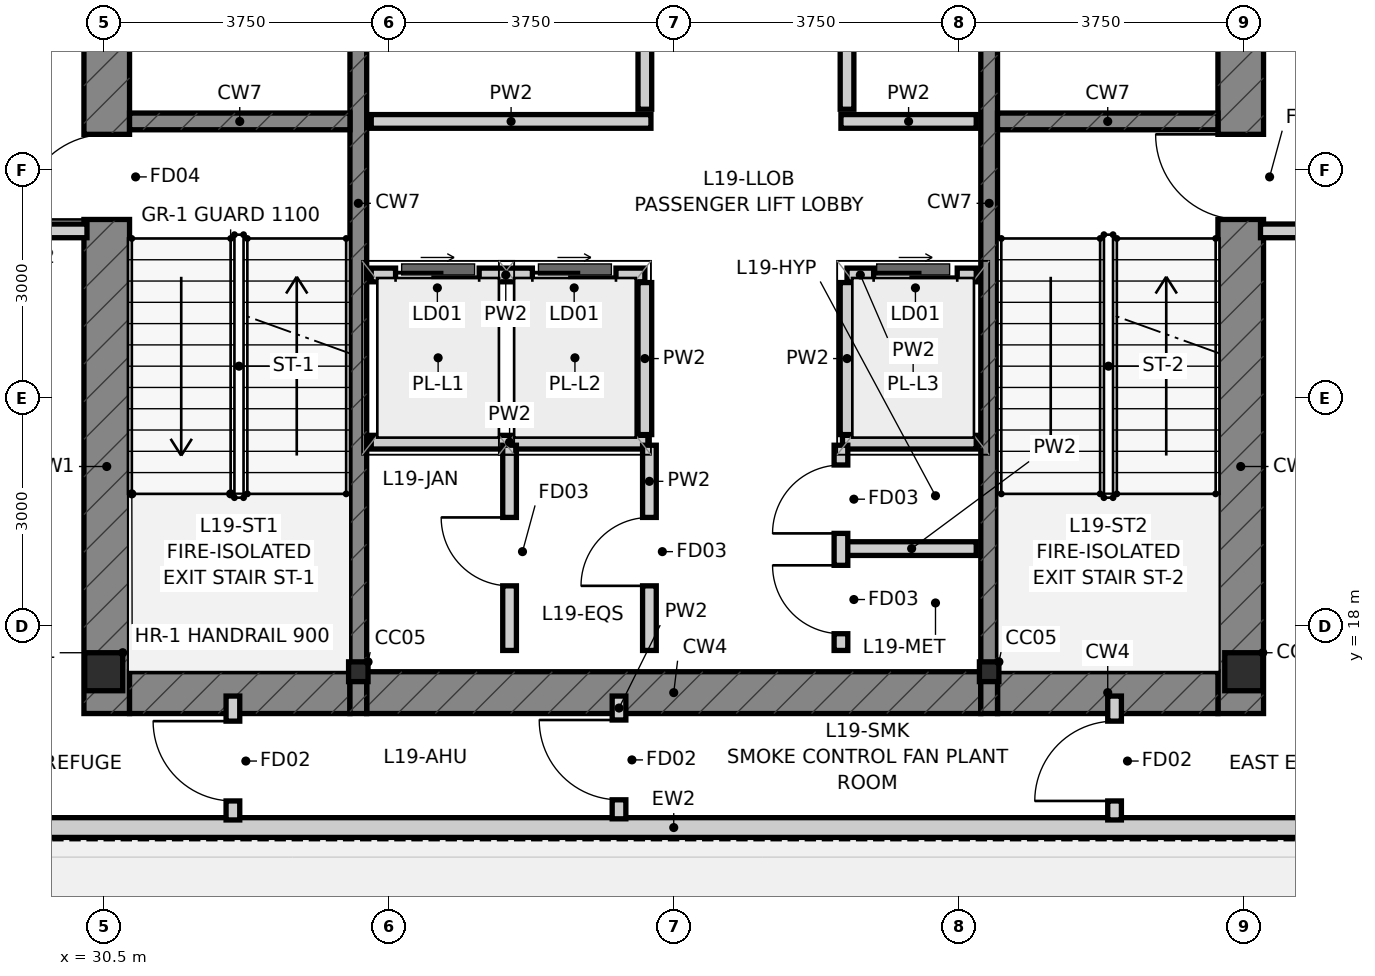
"""IFC4 building model, lengths in metres.
Left out: names, types, materials, properties, quantities, classifications, styles, units other than length and angle.
Written with IfcOpenShell. Run it as: python <this file> out.ifc"""

import sys

from ifc_helpers import new_model, si_unit, direction, frame, frame_2d, origin, origin_2d, place, context, subcontext, project, spatial, rectangle, i_section, extrude, source, transform, mapped, element, fill, save


model = new_model("IFC4")
c1 = context("Model", 3, precision=1e-05, world=origin(), true_north=direction((0.0, 1.0)))
c2 = subcontext(c1, "Body", "Model", "MODEL_VIEW")
j1 = project(units=[si_unit("LENGTHUNIT", "METRE"), si_unit("PLANEANGLEUNIT", "RADIAN")], contexts=[c1])
p1 = place(None, origin())
s1 = spatial("IfcSite", under=j1, at=p1, CompositionType="ELEMENT")
p2 = place(p1, origin())
s2 = spatial("IfcBuilding", under=s1, at=p2, CompositionType="ELEMENT")
p3 = place(p2, frame((0.0, 0.0, 75.05)))
s3 = spatial("IfcBuildingStorey", under=s2, at=p3, CompositionType="ELEMENT", Elevation=75.05)
m1 = source(origin(), c2, "Body", "SweptSolid", [
    extrude(i_section(OverallWidth=0.5, OverallDepth=0.5, WebThickness=0.028, FlangeThickness=0.04, at=origin_2d()), origin(), (0.0, 0.0, 1.0), 4.8),
])
for number, where, z_axis, x_axis in (
    (1, (30.5, 17.4, 0.0), (0.0, 0.0, 1.0), (1.0, 0.0, 0.0)),
    (2, (45.5, 17.4, 0.0), (0.0, 0.0, 1.0), (1.0, 0.0, 0.0)),
):
    element("IfcColumn", number, at=place(p3, frame(where, z_axis=z_axis, x_axis=x_axis)), inside=s3, PredefinedType="COLUMN", context=c2, shape_type="MappedRepresentation", body=[
        mapped(m1, transform((0.0, 0.0, 0.0), scale=1.0)),
    ])
m2 = source(origin(), c2, "Body", "SweptSolid", [
    extrude(i_section(OverallWidth=0.256, OverallDepth=0.26, WebThickness=0.01, FlangeThickness=0.017, at=origin_2d()), origin(), (0.0, 0.0, 1.0), 4.8),
])
for number, where, z_axis, x_axis in (
    (3, (33.85, 17.4, 0.0), (0.0, 0.0, 1.0), (1.0, 0.0, 0.0)),
    (4, (42.15, 17.4, 0.0), (0.0, 0.0, 1.0), (1.0, 0.0, 0.0)),
):
    element("IfcColumn", number, at=place(p3, frame(where, z_axis=z_axis, x_axis=x_axis)), inside=s3, PredefinedType="COLUMN", context=c2, shape_type="MappedRepresentation", body=[
        mapped(m2, transform((0.0, 0.0, 0.0), scale=1.0)),
    ])
p4 = place(p3, frame((30.54, 16.85, 0.0), z_axis=(0.0, 0.0, 1.0), x_axis=(0.0, 1.0, 0.0)))
e5 = element("IfcWall", 5, at=p4, inside=s3, PredefinedType="SHEAR", context=c2, shape_type="SweptSolid", body=[
    extrude(rectangle(XDim=13.425, YDim=0.6, at=frame_2d((6.712, 0.0))), origin(), (0.0, 0.0, 1.0), 4.8),
])
p5 = place(p4, frame((6.5, 0.0, 0.0)))
e6 = element("IfcOpeningElement", 6, at=p5, cuts=e5, PredefinedType="OPENING", context=c2, shape_type="SweptSolid", body=[
    extrude(rectangle(XDim=1.12, YDim=2.15, at=frame_2d((0.56, 1.075))), frame((0.0, 0.312, 0.0), z_axis=(0.0, -1.0, 0.0), x_axis=(1.0, 0.0, 0.0)), (0.0, 0.0, 1.0), 0.624),
])
p6 = place(p4, frame((10.95, 0.0, 0.0)))
e7 = element("IfcOpeningElement", 7, at=p6, cuts=e5, PredefinedType="OPENING", context=c2, shape_type="SweptSolid", body=[
    extrude(rectangle(XDim=1.2, YDim=2.2, at=frame_2d((0.6, 1.1))), frame((0.0, 0.312, 0.0), z_axis=(0.0, -1.0, 0.0), x_axis=(1.0, 0.0, 0.0)), (0.0, 0.0, 1.0), 0.624),
])
p7 = place(p3, frame((45.46, 16.85, 0.0), z_axis=(0.0, 0.0, 1.0), x_axis=(0.0, 1.0, 0.0)))
e8 = element("IfcWall", 8, at=p7, inside=s3, PredefinedType="SHEAR", context=c2, shape_type="SweptSolid", body=[
    extrude(rectangle(XDim=13.425, YDim=0.6, at=frame_2d((6.712, 0.0))), origin(), (0.0, 0.0, 1.0), 4.8),
])
p8 = place(p7, frame((6.5, 0.0, 0.0)))
e9 = element("IfcOpeningElement", 9, at=p8, cuts=e8, PredefinedType="OPENING", context=c2, shape_type="SweptSolid", body=[
    extrude(rectangle(XDim=1.12, YDim=2.15, at=frame_2d((0.56, 1.075))), frame((0.0, 0.312, 0.0), z_axis=(0.0, -1.0, 0.0), x_axis=(1.0, 0.0, 0.0)), (0.0, 0.0, 1.0), 0.624),
])
p9 = place(p7, frame((10.95, 0.0, 0.0)))
e10 = element("IfcOpeningElement", 10, at=p9, cuts=e8, PredefinedType="OPENING", context=c2, shape_type="SweptSolid", body=[
    extrude(rectangle(XDim=1.2, YDim=2.2, at=frame_2d((0.6, 1.1))), frame((0.0, 0.312, 0.0), z_axis=(0.0, -1.0, 0.0), x_axis=(1.0, 0.0, 0.0)), (0.0, 0.0, 1.0), 0.624),
])
p10 = place(p3, frame((30.84, 17.125, 0.0), z_axis=(0.0, 0.0, 1.0), x_axis=(1.0, 0.0, 0.0)))
e11 = element("IfcWall", 11, at=p10, inside=s3, PredefinedType="SHEAR", context=c2, shape_type="SweptSolid", body=[
    extrude(rectangle(XDim=2.9, YDim=0.55, at=frame_2d((1.45, 0.0))), origin(), (0.0, 0.0, 1.0), 4.8),
])
p11 = place(p3, frame((33.96, 17.125, 0.0), z_axis=(0.0, 0.0, 1.0), x_axis=(1.0, 0.0, 0.0)))
e12 = element("IfcWall", 12, at=p11, inside=s3, PredefinedType="SHEAR", context=c2, shape_type="SweptSolid", body=[
    extrude(rectangle(XDim=8.08, YDim=0.55, at=frame_2d((4.04, 0.0))), origin(), (0.0, 0.0, 1.0), 4.8),
])
p12 = place(p3, frame((42.26, 17.125, 0.0), z_axis=(0.0, 0.0, 1.0), x_axis=(1.0, 0.0, 0.0)))
e13 = element("IfcWall", 13, at=p12, inside=s3, PredefinedType="SHEAR", context=c2, shape_type="SweptSolid", body=[
    extrude(rectangle(XDim=2.9, YDim=0.55, at=frame_2d((1.45, 0.0))), origin(), (0.0, 0.0, 1.0), 4.8),
])
for number, where, z_axis, x_axis in (
    (14, (33.85, 16.85, 0.0), (0.0, 0.0, 1.0), (0.0, 1.0, 0.0)),
    (15, (42.15, 16.85, 0.0), (0.0, 0.0, 1.0), (0.0, 1.0, 0.0)),
):
    element("IfcWall", number, at=place(p3, frame(where, z_axis=z_axis, x_axis=x_axis)), inside=s3, PredefinedType="SHEAR", context=c2, shape_type="SweptSolid", body=[
        extrude(rectangle(XDim=13.425, YDim=0.22, at=frame_2d((6.712, 0.0))), origin(), (0.0, 0.0, 1.0), 4.8),
    ])
for number, where, z_axis, x_axis in (
    (16, (30.84, 24.64, 0.0), (0.0, 0.0, 1.0), (1.0, 0.0, 0.0)),
    (17, (42.26, 24.64, 0.0), (0.0, 0.0, 1.0), (1.0, 0.0, 0.0)),
):
    element("IfcWall", number, at=place(p3, frame(where, z_axis=z_axis, x_axis=x_axis)), inside=s3, PredefinedType="SHEAR", context=c2, shape_type="SweptSolid", body=[
        extrude(rectangle(XDim=2.9, YDim=0.22, at=frame_2d((1.45, 0.0))), origin(), (0.0, 0.0, 1.0), 4.8),
    ])
p13 = place(p3, frame((26.95, 15.35, 0.0), z_axis=(0.0, 0.0, 1.0), x_axis=(1.0, 0.0, 0.0)))
e18 = element("IfcWall", 18, at=p13, inside=s3, PredefinedType="STANDARD", context=c2, shape_type="SweptSolid", body=[
    extrude(rectangle(XDim=22.1, YDim=0.26, at=frame_2d((11.05, 0.0))), origin(), (0.0, 0.0, 1.0), 4.176),
])
p14 = place(p3, frame((34.02, 22.62, 0.0), z_axis=(0.0, 0.0, 1.0), x_axis=(1.0, 0.0, 0.0)))
e19 = element("IfcWall", 19, at=p14, inside=s3, PredefinedType="PARTITIONING", context=c2, shape_type="SweptSolid", body=[
    extrude(rectangle(XDim=3.6, YDim=0.18, at=frame_2d((1.8, 0.0))), origin(), (0.0, 0.0, 1.0), 4.55),
])
p15 = place(p14, frame((0.32, 0.0, 0.0)))
e20 = element("IfcOpeningElement", 20, at=p15, cuts=e19, PredefinedType="OPENING", context=c2, shape_type="SweptSolid", body=[
    extrude(rectangle(XDim=1.1, YDim=2.2, at=frame_2d((0.55, 1.1))), frame((0.0, 0.102, 0.0), z_axis=(0.0, -1.0, 0.0), x_axis=(1.0, 0.0, 0.0)), (0.0, 0.0, 1.0), 0.204),
])
p16 = place(p14, frame((2.12, 0.0, 0.0)))
e21 = element("IfcOpeningElement", 21, at=p16, cuts=e19, PredefinedType="OPENING", context=c2, shape_type="SweptSolid", body=[
    extrude(rectangle(XDim=1.1, YDim=2.2, at=frame_2d((0.55, 1.1))), frame((0.0, 0.102, 0.0), z_axis=(0.0, -1.0, 0.0), x_axis=(1.0, 0.0, 0.0)), (0.0, 0.0, 1.0), 0.204),
])
p17 = place(p3, frame((40.28, 22.62, 0.0), z_axis=(0.0, 0.0, 1.0), x_axis=(1.0, 0.0, 0.0)))
e22 = element("IfcWall", 22, at=p17, inside=s3, PredefinedType="PARTITIONING", context=c2, shape_type="SweptSolid", body=[
    extrude(rectangle(XDim=1.7, YDim=0.18, at=frame_2d((0.85, 0.0))), origin(), (0.0, 0.0, 1.0), 4.55),
])
p18 = place(p17, frame((0.35, 0.0, 0.0)))
e23 = element("IfcOpeningElement", 23, at=p18, cuts=e22, PredefinedType="OPENING", context=c2, shape_type="SweptSolid", body=[
    extrude(rectangle(XDim=1.1, YDim=2.2, at=frame_2d((0.55, 1.1))), frame((0.0, 0.102, 0.0), z_axis=(0.0, -1.0, 0.0), x_axis=(1.0, 0.0, 0.0)), (0.0, 0.0, 1.0), 0.204),
])
for number, where, z_axis, x_axis in (
    (24, (37.62, 20.52, 0.0), (0.0, 0.0, 1.0), (0.0, 1.0, 0.0)),
    (25, (40.28, 20.52, 0.0), (0.0, 0.0, 1.0), (0.0, 1.0, 0.0)),
    (26, (37.62, 24.8, 0.0), (0.0, 0.0, 1.0), (0.0, 1.0, 0.0)),
    (27, (40.28, 24.8, 0.0), (0.0, 0.0, 1.0), (0.0, 1.0, 0.0)),
):
    element("IfcWall", number, at=place(p3, frame(where, z_axis=z_axis, x_axis=x_axis)), inside=s3, PredefinedType="PARTITIONING", context=c2, shape_type="SweptSolid", body=[
        extrude(rectangle(XDim=2.0, YDim=0.18, at=frame_2d((1.0, 0.0))), origin(), (0.0, 0.0, 1.0), 4.55),
    ])
p19 = place(p3, frame((34.02, 24.64, 0.0), z_axis=(0.0, 0.0, 1.0), x_axis=(1.0, 0.0, 0.0)))
e28 = element("IfcWall", 28, at=p19, inside=s3, PredefinedType="PARTITIONING", context=c2, shape_type="SweptSolid", body=[
    extrude(rectangle(XDim=3.68, YDim=0.18, at=frame_2d((1.84, 0.0))), origin(), (0.0, 0.0, 1.0), 4.55),
])
p20 = place(p3, frame((40.2, 24.64, 0.0), z_axis=(0.0, 0.0, 1.0), x_axis=(1.0, 0.0, 0.0)))
e29 = element("IfcWall", 29, at=p20, inside=s3, PredefinedType="PARTITIONING", context=c2, shape_type="SweptSolid", body=[
    extrude(rectangle(XDim=1.78, YDim=0.18, at=frame_2d((0.89, 0.0))), origin(), (0.0, 0.0, 1.0), 4.55),
])
p21 = place(p3, frame((27.065, 23.2, 0.0), z_axis=(0.0, 0.0, 1.0), x_axis=(1.0, 0.0, 0.0)))
e30 = element("IfcWall", 30, at=p21, inside=s3, PredefinedType="PARTITIONING", context=c2, shape_type="SweptSolid", body=[
    extrude(rectangle(XDim=3.215, YDim=0.18, at=frame_2d((1.607, 0.0))), origin(), (0.0, 0.0, 1.0), 4.55),
])
p22 = place(p21, frame((0.75, 0.0, 0.0)))
e31 = element("IfcOpeningElement", 31, at=p22, cuts=e30, PredefinedType="OPENING", context=c2, shape_type="SweptSolid", body=[
    extrude(rectangle(XDim=1.05, YDim=2.15, at=frame_2d((0.525, 1.075))), frame((0.0, 0.102, 0.0), z_axis=(0.0, -1.0, 0.0), x_axis=(1.0, 0.0, 0.0)), (0.0, 0.0, 1.0), 0.204),
])
p23 = place(p3, frame((45.72, 23.2, 0.0), z_axis=(0.0, 0.0, 1.0), x_axis=(1.0, 0.0, 0.0)))
e32 = element("IfcWall", 32, at=p23, inside=s3, PredefinedType="PARTITIONING", context=c2, shape_type="SweptSolid", body=[
    extrude(rectangle(XDim=3.215, YDim=0.18, at=frame_2d((1.607, 0.0))), origin(), (0.0, 0.0, 1.0), 4.55),
])
p24 = place(p23, frame((0.75, 0.0, 0.0)))
e33 = element("IfcOpeningElement", 33, at=p24, cuts=e32, PredefinedType="OPENING", context=c2, shape_type="SweptSolid", body=[
    extrude(rectangle(XDim=1.05, YDim=2.15, at=frame_2d((0.525, 1.075))), frame((0.0, 0.102, 0.0), z_axis=(0.0, -1.0, 0.0), x_axis=(1.0, 0.0, 0.0)), (0.0, 0.0, 1.0), 0.204),
])
p25 = place(p3, frame((34.02, 20.42, 0.0), z_axis=(0.0, 0.0, 1.0), x_axis=(1.0, 0.0, 0.0)))
e34 = element("IfcWall", 34, at=p25, inside=s3, PredefinedType="PARTITIONING", context=c2, shape_type="SweptSolid", body=[
    extrude(rectangle(XDim=3.64, YDim=0.18, at=frame_2d((1.82, 0.0))), origin(), (0.0, 0.0, 1.0), 4.55),
])
p26 = place(p3, frame((40.22, 20.42, 0.0), z_axis=(0.0, 0.0, 1.0), x_axis=(1.0, 0.0, 0.0)))
e35 = element("IfcWall", 35, at=p26, inside=s3, PredefinedType="PARTITIONING", context=c2, shape_type="SweptSolid", body=[
    extrude(rectangle(XDim=1.76, YDim=0.18, at=frame_2d((0.88, 0.0))), origin(), (0.0, 0.0, 1.0), 4.55),
])
p27 = place(p3, frame((35.84, 17.68, 0.0), z_axis=(0.0, 0.0, 1.0), x_axis=(0.0, 1.0, 0.0)))
e36 = element("IfcWall", 36, at=p27, inside=s3, PredefinedType="PARTITIONING", context=c2, shape_type="SweptSolid", body=[
    extrude(rectangle(XDim=2.7, YDim=0.18, at=frame_2d((1.35, 0.0))), origin(), (0.0, 0.0, 1.0), 4.55),
])
p28 = place(p27, frame((0.85, 0.0, 0.0)))
e37 = element("IfcOpeningElement", 37, at=p28, cuts=e36, PredefinedType="OPENING", context=c2, shape_type="SweptSolid", body=[
    extrude(rectangle(XDim=0.9, YDim=2.1, at=frame_2d((0.45, 1.05))), frame((0.0, 0.102, 0.0), z_axis=(0.0, -1.0, 0.0), x_axis=(1.0, 0.0, 0.0)), (0.0, 0.0, 1.0), 0.204),
])
p29 = place(p3, frame((37.68, 17.68, 0.0), z_axis=(0.0, 0.0, 1.0), x_axis=(0.0, 1.0, 0.0)))
e38 = element("IfcWall", 38, at=p29, inside=s3, PredefinedType="PARTITIONING", context=c2, shape_type="SweptSolid", body=[
    extrude(rectangle(XDim=2.7, YDim=0.18, at=frame_2d((1.35, 0.0))), origin(), (0.0, 0.0, 1.0), 4.55),
])
p30 = place(p29, frame((0.85, 0.0, 0.0)))
e39 = element("IfcOpeningElement", 39, at=p30, cuts=e38, PredefinedType="OPENING", context=c2, shape_type="SweptSolid", body=[
    extrude(rectangle(XDim=0.9, YDim=2.1, at=frame_2d((0.45, 1.05))), frame((0.0, 0.102, 0.0), z_axis=(0.0, -1.0, 0.0), x_axis=(1.0, 0.0, 0.0)), (0.0, 0.0, 1.0), 0.204),
])
p31 = place(p3, frame((40.28, 19.02, 0.0), z_axis=(0.0, 0.0, 1.0), x_axis=(1.0, 0.0, 0.0)))
e40 = element("IfcWall", 40, at=p31, inside=s3, PredefinedType="PARTITIONING", context=c2, shape_type="SweptSolid", body=[
    extrude(rectangle(XDim=1.7, YDim=0.18, at=frame_2d((0.85, 0.0))), origin(), (0.0, 0.0, 1.0), 4.55),
])
p32 = place(p3, frame((40.2, 17.68, 0.0), z_axis=(0.0, 0.0, 1.0), x_axis=(0.0, 1.0, 0.0)))
e41 = element("IfcWall", 41, at=p32, inside=s3, PredefinedType="PARTITIONING", context=c2, shape_type="SweptSolid", body=[
    extrude(rectangle(XDim=2.7, YDim=0.18, at=frame_2d((1.35, 0.0))), origin(), (0.0, 0.0, 1.0), 4.55),
])
p33 = place(p32, frame((0.22, 0.0, 0.0)))
e42 = element("IfcOpeningElement", 42, at=p33, cuts=e41, PredefinedType="OPENING", context=c2, shape_type="SweptSolid", body=[
    extrude(rectangle(XDim=0.9, YDim=2.1, at=frame_2d((0.45, 1.05))), frame((0.0, 0.102, 0.0), z_axis=(0.0, -1.0, 0.0), x_axis=(1.0, 0.0, 0.0)), (0.0, 0.0, 1.0), 0.204),
])
p34 = place(p32, frame((1.54, 0.0, 0.0)))
e43 = element("IfcOpeningElement", 43, at=p34, cuts=e41, PredefinedType="OPENING", context=c2, shape_type="SweptSolid", body=[
    extrude(rectangle(XDim=0.9, YDim=2.1, at=frame_2d((0.45, 1.05))), frame((0.0, 0.102, 0.0), z_axis=(0.0, -1.0, 0.0), x_axis=(1.0, 0.0, 0.0)), (0.0, 0.0, 1.0), 0.204),
])
p35 = place(p3, frame((32.2, 15.45, 0.0), z_axis=(0.0, 0.0, 1.0), x_axis=(0.0, 1.0, 0.0)))
e44 = element("IfcWall", 44, at=p35, inside=s3, PredefinedType="PARTITIONING", context=c2, shape_type="SweptSolid", body=[
    extrude(rectangle(XDim=1.63, YDim=0.18, at=frame_2d((0.815, 0.0))), origin(), (0.0, 0.0, 1.0), 4.55),
])
p36 = place(p35, frame((0.25, 0.0, 0.0)))
e45 = element("IfcOpeningElement", 45, at=p36, cuts=e44, PredefinedType="OPENING", context=c2, shape_type="SweptSolid", body=[
    extrude(rectangle(XDim=1.05, YDim=2.15, at=frame_2d((0.525, 1.075))), frame((0.0, 0.102, 0.0), z_axis=(0.0, -1.0, 0.0), x_axis=(1.0, 0.0, 0.0)), (0.0, 0.0, 1.0), 0.204),
])
p37 = place(p3, frame((43.8, 15.45, 0.0), z_axis=(0.0, 0.0, 1.0), x_axis=(0.0, 1.0, 0.0)))
e46 = element("IfcWall", 46, at=p37, inside=s3, PredefinedType="PARTITIONING", context=c2, shape_type="SweptSolid", body=[
    extrude(rectangle(XDim=1.63, YDim=0.18, at=frame_2d((0.815, 0.0))), origin(), (0.0, 0.0, 1.0), 4.55),
])
p38 = place(p37, frame((0.25, 0.0, 0.0)))
e47 = element("IfcOpeningElement", 47, at=p38, cuts=e46, PredefinedType="OPENING", context=c2, shape_type="SweptSolid", body=[
    extrude(rectangle(XDim=1.05, YDim=2.15, at=frame_2d((0.525, 1.075))), frame((0.0, 0.102, 0.0), z_axis=(0.0, -1.0, 0.0), x_axis=(1.0, 0.0, 0.0)), (0.0, 0.0, 1.0), 0.204),
])
p39 = place(p3, frame((37.28, 15.465, 0.0), z_axis=(0.0, 0.0, 1.0), x_axis=(0.0, 1.0, 0.0)))
e48 = element("IfcWall", 48, at=p39, inside=s3, PredefinedType="PARTITIONING", context=c2, shape_type="SweptSolid", body=[
    extrude(rectangle(XDim=1.615, YDim=0.18, at=frame_2d((0.808, 0.0))), origin(), (0.0, 0.0, 1.0), 4.55),
])
p40 = place(p39, frame((0.25, 0.0, 0.0)))
e49 = element("IfcOpeningElement", 49, at=p40, cuts=e48, PredefinedType="OPENING", context=c2, shape_type="SweptSolid", body=[
    extrude(rectangle(XDim=1.05, YDim=2.15, at=frame_2d((0.525, 1.075))), frame((0.0, 0.102, 0.0), z_axis=(0.0, -1.0, 0.0), x_axis=(1.0, 0.0, 0.0)), (0.0, 0.0, 1.0), 0.204),
])
p41 = place(p5, origin())
e50 = element("IfcDoor", 50, at=p41, inside=s3, OperationType="SINGLE_SWING_LEFT", PredefinedType="DOOR", context=c2, shape_type="SweptSolid", body=[
    extrude(rectangle(XDim=1.12, YDim=2.15, at=frame_2d((0.56, 1.075))), frame((0.0, 0.025, 0.0), z_axis=(0.0, -1.0, 0.0), x_axis=(1.0, 0.0, 0.0)), (0.0, 0.0, 1.0), 0.05),
])
fill(e6, e50)
p42 = place(p8, origin())
e51 = element("IfcDoor", 51, at=p42, inside=s3, OperationType="SINGLE_SWING_RIGHT", PredefinedType="DOOR", context=c2, shape_type="SweptSolid", body=[
    extrude(rectangle(XDim=1.12, YDim=2.15, at=frame_2d((0.56, 1.075))), frame((0.0, 0.025, 0.0), z_axis=(0.0, -1.0, 0.0), x_axis=(1.0, 0.0, 0.0)), (0.0, 0.0, 1.0), 0.05),
])
fill(e9, e51)
p43 = place(p15, origin())
e52 = element("IfcDoor", 52, at=p43, inside=s3, OperationType="SLIDING_TO_LEFT", PredefinedType="DOOR", context=c2, shape_type="SweptSolid", body=[
    extrude(rectangle(XDim=1.1, YDim=2.2, at=frame_2d((0.55, 1.1))), frame((0.0, 0.025, 0.0), z_axis=(0.0, -1.0, 0.0), x_axis=(1.0, 0.0, 0.0)), (0.0, 0.0, 1.0), 0.05),
])
fill(e20, e52)
p44 = place(p16, origin())
e53 = element("IfcDoor", 53, at=p44, inside=s3, OperationType="SLIDING_TO_RIGHT", PredefinedType="DOOR", context=c2, shape_type="SweptSolid", body=[
    extrude(rectangle(XDim=1.1, YDim=2.2, at=frame_2d((0.55, 1.1))), frame((0.0, 0.025, 0.0), z_axis=(0.0, -1.0, 0.0), x_axis=(1.0, 0.0, 0.0)), (0.0, 0.0, 1.0), 0.05),
])
fill(e21, e53)
p45 = place(p18, origin())
e54 = element("IfcDoor", 54, at=p45, inside=s3, OperationType="SLIDING_TO_LEFT", PredefinedType="DOOR", context=c2, shape_type="SweptSolid", body=[
    extrude(rectangle(XDim=1.1, YDim=2.2, at=frame_2d((0.55, 1.1))), frame((0.0, 0.025, 0.0), z_axis=(0.0, -1.0, 0.0), x_axis=(1.0, 0.0, 0.0)), (0.0, 0.0, 1.0), 0.05),
])
fill(e23, e54)
p46 = place(p28, origin())
e55 = element("IfcDoor", 55, at=p46, inside=s3, OperationType="SINGLE_SWING_RIGHT", PredefinedType="DOOR", context=c2, shape_type="SweptSolid", body=[
    extrude(rectangle(XDim=0.9, YDim=2.1, at=frame_2d((0.45, 1.05))), frame((0.0, 0.025, 0.0), z_axis=(0.0, -1.0, 0.0), x_axis=(1.0, 0.0, 0.0)), (0.0, 0.0, 1.0), 0.05),
])
fill(e37, e55)
p47 = place(p30, origin())
e56 = element("IfcDoor", 56, at=p47, inside=s3, OperationType="SINGLE_SWING_LEFT", PredefinedType="DOOR", context=c2, shape_type="SweptSolid", body=[
    extrude(rectangle(XDim=0.9, YDim=2.1, at=frame_2d((0.45, 1.05))), frame((0.0, 0.025, 0.0), z_axis=(0.0, -1.0, 0.0), x_axis=(1.0, 0.0, 0.0)), (0.0, 0.0, 1.0), 0.05),
])
fill(e39, e56)
p48 = place(p33, origin())
e57 = element("IfcDoor", 57, at=p48, inside=s3, OperationType="SINGLE_SWING_RIGHT", PredefinedType="DOOR", context=c2, shape_type="SweptSolid", body=[
    extrude(rectangle(XDim=0.9, YDim=2.1, at=frame_2d((0.45, 1.05))), frame((0.0, 0.025, 0.0), z_axis=(0.0, -1.0, 0.0), x_axis=(1.0, 0.0, 0.0)), (0.0, 0.0, 1.0), 0.05),
])
fill(e42, e57)
p49 = place(p34, origin())
e58 = element("IfcDoor", 58, at=p49, inside=s3, OperationType="SINGLE_SWING_LEFT", PredefinedType="DOOR", context=c2, shape_type="SweptSolid", body=[
    extrude(rectangle(XDim=0.9, YDim=2.1, at=frame_2d((0.45, 1.05))), frame((0.0, 0.025, 0.0), z_axis=(0.0, -1.0, 0.0), x_axis=(1.0, 0.0, 0.0)), (0.0, 0.0, 1.0), 0.05),
])
fill(e43, e58)
p50 = place(p36, origin())
e59 = element("IfcDoor", 59, at=p50, inside=s3, OperationType="SINGLE_SWING_RIGHT", PredefinedType="DOOR", context=c2, shape_type="SweptSolid", body=[
    extrude(rectangle(XDim=1.05, YDim=2.15, at=frame_2d((0.525, 1.075))), frame((0.0, 0.025, 0.0), z_axis=(0.0, -1.0, 0.0), x_axis=(1.0, 0.0, 0.0)), (0.0, 0.0, 1.0), 0.05),
])
fill(e45, e59)
p51 = place(p38, origin())
e60 = element("IfcDoor", 60, at=p51, inside=s3, OperationType="SINGLE_SWING_LEFT", PredefinedType="DOOR", context=c2, shape_type="SweptSolid", body=[
    extrude(rectangle(XDim=1.05, YDim=2.15, at=frame_2d((0.525, 1.075))), frame((0.0, 0.025, 0.0), z_axis=(0.0, -1.0, 0.0), x_axis=(1.0, 0.0, 0.0)), (0.0, 0.0, 1.0), 0.05),
])
fill(e47, e60)
p52 = place(p40, origin())
e61 = element("IfcDoor", 61, at=p52, inside=s3, OperationType="SINGLE_SWING_RIGHT", PredefinedType="DOOR", context=c2, shape_type="SweptSolid", body=[
    extrude(rectangle(XDim=1.05, YDim=2.15, at=frame_2d((0.525, 1.075))), frame((0.0, 0.025, 0.0), z_axis=(0.0, -1.0, 0.0), x_axis=(1.0, 0.0, 0.0)), (0.0, 0.0, 1.0), 0.05),
])
fill(e49, e61)
save(model, sys.argv[1])
